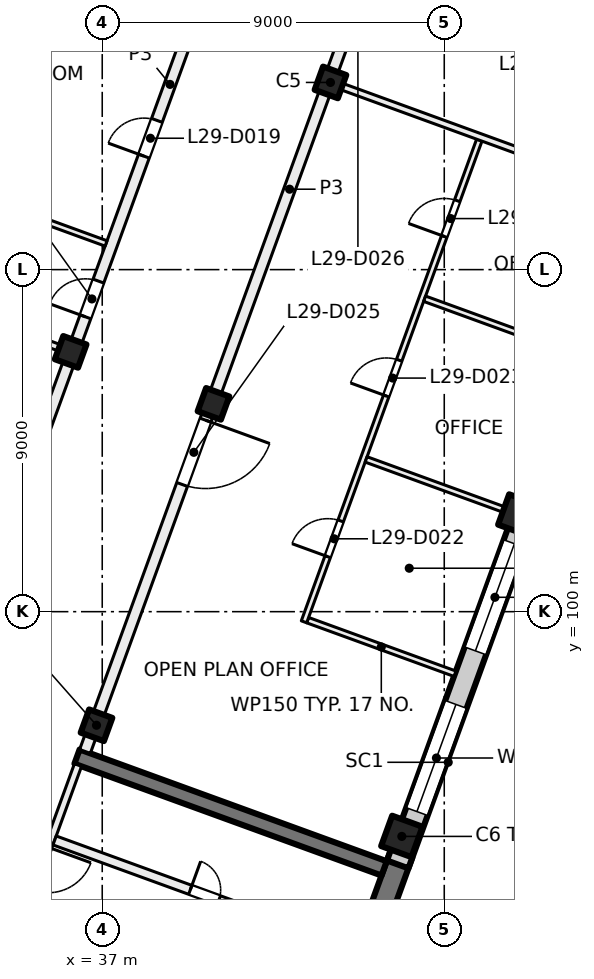
"""IFC4 building model, lengths in metres.
Left out: names, types, materials, properties, quantities, classifications, styles, units other than length and angle.
Written with IfcOpenShell. Run it as: python <this file> out.ifc"""

import sys

from ifc_helpers import new_model, si_unit, direction, frame, frame_2d, origin, origin_2d, place, context, subcontext, project, spatial, rectangle, extrude, element, fill, save


model = new_model("IFC4")
c1 = context("Model", 3, precision=1e-05, world=origin(), true_north=direction((0.0, 1.0)))
c2 = subcontext(c1, "Body", "Model", "MODEL_VIEW")
j1 = project(units=[si_unit("LENGTHUNIT", "METRE"), si_unit("PLANEANGLEUNIT", "RADIAN")], contexts=[c1])
p1 = place(None, origin())
s1 = spatial("IfcSite", under=j1, at=p1, CompositionType="ELEMENT")
p2 = place(p1, origin())
s2 = spatial("IfcBuilding", under=s1, at=p2, CompositionType="ELEMENT")
p3 = place(p2, frame((0.0, 0.0, 125.0)))
s3 = spatial("IfcBuildingStorey", under=s2, at=p3, CompositionType="ELEMENT", Elevation=125.0)
for number, where, z_axis, x_axis in (
    (1, (43.006, 113.925, 0.0), (0.0, 0.0, 1.0), (-0.342, -0.94, 0.0)),
    (2, (39.927, 105.468, 0.0), (0.0, 0.0, 1.0), (-0.342, -0.94, 0.0)),
    (3, (36.849, 97.011, 0.0), (0.0, 0.0, 1.0), (-0.342, -0.94, 0.0)),
    (4, (36.169, 106.836, 0.0), (0.0, 0.0, 1.0), (-0.342, -0.94, 0.0)),
):
    element("IfcColumn", number, at=place(p3, frame(where, z_axis=z_axis, x_axis=x_axis)), inside=s3, PredefinedType="COLUMN", context=c2, shape_type="SweptSolid", body=[
        extrude(rectangle(XDim=0.65, YDim=0.65, at=origin_2d()), origin(), (0.0, 0.0, 1.0), 4.0),
    ])
for number, where, z_axis, x_axis in (
    (5, (47.962, 102.544, 0.0), (0.0, 0.0, 1.0), (-0.342, -0.94, 0.0)),
    (6, (44.884, 94.087, 0.0), (0.0, 0.0, 1.0), (-0.342, -0.94, 0.0)),
):
    element("IfcColumn", number, at=place(p3, frame(where, z_axis=z_axis, x_axis=x_axis)), inside=s3, PredefinedType="COLUMN", context=c2, shape_type="SweptSolid", body=[
        extrude(rectangle(XDim=0.85, YDim=0.85, at=origin_2d()), origin(), (0.0, 0.0, 1.0), 4.0),
    ])
p4 = place(p3, frame((41.827, 85.249, 0.0), z_axis=(0.0, 0.0, 1.0), x_axis=(0.342017595281, 0.939693548195, 0.0)))
e7 = element("IfcWall", 7, at=p4, inside=s3, PredefinedType="SHEAR", context=c2, shape_type="SweptSolid", body=[
    extrude(rectangle(XDim=8.925, YDim=0.6, at=frame_2d((4.462, 0.0))), origin(), (0.0, 0.0, 1.0), 4.0),
])
p5 = place(p3, frame((44.418, 93.245, 0.0), z_axis=(0.0, 0.0, 1.0), x_axis=(-0.93969060187, 0.342025690201, 0.0)))
e8 = element("IfcWall", 8, at=p5, inside=s3, PredefinedType="SHEAR", context=c2, shape_type="SweptSolid", body=[
    extrude(rectangle(XDim=8.6, YDim=0.4, at=frame_2d((4.3, 0.0))), origin(), (0.0, 0.0, 1.0), 4.0),
])
p6 = place(p3, frame((52.212, 113.783, 0.0), z_axis=(0.0, 0.0, 1.0), x_axis=(-0.34202521188, -0.939690775968, 0.0)))
e9 = element("IfcWall", 9, at=p6, inside=s3, PredefinedType="SOLIDWALL", context=c2, shape_type="SweptSolid", body=[
    extrude(rectangle(XDim=21.745, YDim=0.6, at=frame_2d((10.873, 0.0))), origin(), (0.0, 0.0, 1.0), 3.625),
])
p7 = place(p6, frame((3.765, 0.0, 0.9)))
e10 = element("IfcOpeningElement", 10, at=p7, cuts=e9, PredefinedType="OPENING", context=c2, shape_type="SweptSolid", body=[
    extrude(rectangle(XDim=3.0, YDim=2.4, at=frame_2d((1.5, 1.2))), frame((0.0, 0.31, 0.0), z_axis=(0.0, -1.0, 0.0), x_axis=(1.0, 0.0, 0.0)), (0.0, 0.0, 1.0), 0.62),
])
p8 = place(p6, frame((8.265, 0.0, 0.9)))
e11 = element("IfcOpeningElement", 11, at=p8, cuts=e9, PredefinedType="OPENING", context=c2, shape_type="SweptSolid", body=[
    extrude(rectangle(XDim=3.0, YDim=2.4, at=frame_2d((1.5, 1.2))), frame((0.0, 0.31, 0.0), z_axis=(0.0, -1.0, 0.0), x_axis=(1.0, 0.0, 0.0)), (0.0, 0.0, 1.0), 0.62),
])
p9 = place(p6, frame((12.765, 0.0, 0.9)))
e12 = element("IfcOpeningElement", 12, at=p9, cuts=e9, PredefinedType="OPENING", context=c2, shape_type="SweptSolid", body=[
    extrude(rectangle(XDim=3.0, YDim=2.4, at=frame_2d((1.5, 1.2))), frame((0.0, 0.31, 0.0), z_axis=(0.0, -1.0, 0.0), x_axis=(1.0, 0.0, 0.0)), (0.0, 0.0, 1.0), 0.62),
])
p10 = place(p6, frame((17.265, 0.0, 0.9)))
e13 = element("IfcOpeningElement", 13, at=p10, cuts=e9, PredefinedType="OPENING", context=c2, shape_type="SweptSolid", body=[
    extrude(rectangle(XDim=3.0, YDim=2.4, at=frame_2d((1.5, 1.2))), frame((0.0, 0.31, 0.0), z_axis=(0.0, -1.0, 0.0), x_axis=(1.0, 0.0, 0.0)), (0.0, 0.0, 1.0), 0.62),
])
p11 = place(p3, frame((24.666, 100.669, 0.0), z_axis=(0.0, 0.0, 1.0), x_axis=(0.34201964167, 0.939692803373, 0.0)))
e14 = element("IfcWall", 14, at=p11, inside=s3, PredefinedType="SOLIDWALL", context=c2, shape_type="SweptSolid", body=[
    extrude(rectangle(XDim=32.884, YDim=0.6, at=frame_2d((16.442, 0.0))), origin(), (0.0, 0.0, 1.0), 3.625),
])
p12 = place(p11, frame((1.48, 0.0, 0.9)))
e15 = element("IfcOpeningElement", 15, at=p12, cuts=e14, PredefinedType="OPENING", context=c2, shape_type="SweptSolid", body=[
    extrude(rectangle(XDim=3.0, YDim=2.4, at=frame_2d((1.5, 1.2))), frame((0.0, 0.31, 0.0), z_axis=(0.0, -1.0, 0.0), x_axis=(1.0, 0.0, 0.0)), (0.0, 0.0, 1.0), 0.62),
])
p13 = place(p11, frame((5.98, 0.0, 0.9)))
e16 = element("IfcOpeningElement", 16, at=p13, cuts=e14, PredefinedType="OPENING", context=c2, shape_type="SweptSolid", body=[
    extrude(rectangle(XDim=3.0, YDim=2.4, at=frame_2d((1.5, 1.2))), frame((0.0, 0.31, 0.0), z_axis=(0.0, -1.0, 0.0), x_axis=(1.0, 0.0, 0.0)), (0.0, 0.0, 1.0), 0.62),
])
p14 = place(p11, frame((10.48, 0.0, 0.9)))
e17 = element("IfcOpeningElement", 17, at=p14, cuts=e14, PredefinedType="OPENING", context=c2, shape_type="SweptSolid", body=[
    extrude(rectangle(XDim=3.0, YDim=2.4, at=frame_2d((1.5, 1.2))), frame((0.0, 0.31, 0.0), z_axis=(0.0, -1.0, 0.0), x_axis=(1.0, 0.0, 0.0)), (0.0, 0.0, 1.0), 0.62),
])
p15 = place(p11, frame((14.98, 0.0, 0.9)))
e18 = element("IfcOpeningElement", 18, at=p15, cuts=e14, PredefinedType="OPENING", context=c2, shape_type="SweptSolid", body=[
    extrude(rectangle(XDim=3.0, YDim=2.4, at=frame_2d((1.5, 1.2))), frame((0.0, 0.31, 0.0), z_axis=(0.0, -1.0, 0.0), x_axis=(1.0, 0.0, 0.0)), (0.0, 0.0, 1.0), 0.62),
])
p16 = place(p11, frame((19.48, 0.0, 0.9)))
e19 = element("IfcOpeningElement", 19, at=p16, cuts=e14, PredefinedType="OPENING", context=c2, shape_type="SweptSolid", body=[
    extrude(rectangle(XDim=3.0, YDim=2.4, at=frame_2d((1.5, 1.2))), frame((0.0, 0.31, 0.0), z_axis=(0.0, -1.0, 0.0), x_axis=(1.0, 0.0, 0.0)), (0.0, 0.0, 1.0), 0.62),
])
p17 = place(p11, frame((23.98, 0.0, 0.9)))
e20 = element("IfcOpeningElement", 20, at=p17, cuts=e14, PredefinedType="OPENING", context=c2, shape_type="SweptSolid", body=[
    extrude(rectangle(XDim=3.0, YDim=2.4, at=frame_2d((1.5, 1.2))), frame((0.0, 0.31, 0.0), z_axis=(0.0, -1.0, 0.0), x_axis=(1.0, 0.0, 0.0)), (0.0, 0.0, 1.0), 0.62),
])
p18 = place(p11, frame((28.48, 0.0, 0.9)))
e21 = element("IfcOpeningElement", 21, at=p18, cuts=e14, PredefinedType="OPENING", context=c2, shape_type="SweptSolid", body=[
    extrude(rectangle(XDim=3.0, YDim=2.4, at=frame_2d((1.5, 1.2))), frame((0.0, 0.31, 0.0), z_axis=(0.0, -1.0, 0.0), x_axis=(1.0, 0.0, 0.0)), (0.0, 0.0, 1.0), 0.62),
])
p19 = place(p3, frame((36.362, 95.964, 0.0), z_axis=(0.0, 0.0, 1.0), x_axis=(-0.341995824804, -0.939701471648, 0.0)))
e22 = element("IfcWall", 22, at=p19, inside=s3, PredefinedType="PARTITIONING", context=c2, shape_type="SweptSolid", body=[
    extrude(rectangle(XDim=3.8, YDim=0.2, at=frame_2d((1.9, 0.0))), origin(), (0.0, 0.0, 1.0), 3.625),
])
p20 = place(p19, frame((2.3, 0.0, 0.0)))
e23 = element("IfcOpeningElement", 23, at=p20, cuts=e22, PredefinedType="OPENING", context=c2, shape_type="SweptSolid", body=[
    extrude(rectangle(XDim=1.2, YDim=2.1, at=frame_2d((0.6, 1.05))), frame((0.0, 0.11, 0.0), z_axis=(0.0, -1.0, 0.0), x_axis=(1.0, 0.0, 0.0)), (0.0, 0.0, 1.0), 0.22),
])
p21 = place(p3, frame((35.19, 92.453, 0.0), z_axis=(0.0, 0.0, 1.0), x_axis=(0.939691552312, -0.342023078919, 0.0)))
e24 = element("IfcWall", 24, at=p21, inside=s3, PredefinedType="PARTITIONING", context=c2, shape_type="SweptSolid", body=[
    extrude(rectangle(XDim=8.4, YDim=0.2, at=frame_2d((4.2, 0.0))), origin(), (0.0, 0.0, 1.0), 3.625),
])
p22 = place(p21, frame((5.25, 0.0, 0.0)))
e25 = element("IfcOpeningElement", 25, at=p22, cuts=e24, PredefinedType="OPENING", context=c2, shape_type="SweptSolid", body=[
    extrude(rectangle(XDim=1.5, YDim=2.1, at=frame_2d((0.75, 1.05))), frame((0.0, 0.11, 0.0), z_axis=(0.0, -1.0, 0.0), x_axis=(1.0, 0.0, 0.0)), (0.0, 0.0, 1.0), 0.22),
])
p23 = place(p3, frame((35.746, 93.98, 0.0), z_axis=(0.0, 0.0, 1.0), x_axis=(0.939691552312, -0.342023078919, 0.0)))
e26 = element("IfcWall", 26, at=p23, inside=s3, PredefinedType="PARTITIONING", context=c2, shape_type="SweptSolid", body=[
    extrude(rectangle(XDim=8.4, YDim=0.25, at=frame_2d((4.2, 0.0))), origin(), (0.0, 0.0, 1.0), 3.625),
])
p24 = place(p23, frame((3.8, 0.0, 0.0)))
e27 = element("IfcOpeningElement", 27, at=p24, cuts=e26, PredefinedType="OPENING", context=c2, shape_type="SweptSolid", body=[
    extrude(rectangle(XDim=0.8, YDim=2.1, at=frame_2d((0.4, 1.05))), frame((0.0, 0.135, 0.0), z_axis=(0.0, -1.0, 0.0), x_axis=(1.0, 0.0, 0.0)), (0.0, 0.0, 1.0), 0.27),
])
p25 = place(p3, frame((32.63, 108.124, 0.0), z_axis=(0.0, 0.0, 1.0), x_axis=(0.939692277825, -0.342021085601, 0.0)))
e28 = element("IfcWall", 28, at=p25, inside=s3, PredefinedType="PARTITIONING", context=c2, shape_type="SweptSolid", body=[
    extrude(rectangle(XDim=3.666, YDim=0.175, at=frame_2d((1.833, 0.0))), origin(), (0.0, 0.0, 1.0), 3.625),
])
p26 = place(p3, frame((32.881, 97.657, 0.0), z_axis=(0.0, 0.0, 1.0), x_axis=(0.342017360004, 0.939693633828, 0.0)))
e29 = element("IfcWall", 29, at=p26, inside=s3, PredefinedType="PARTITIONING", context=c2, shape_type="SweptSolid", body=[
    extrude(rectangle(XDim=34.516, YDim=0.3, at=frame_2d((17.258, 0.0))), origin(), (0.0, 0.0, 1.0), 3.625),
])
p27 = place(p26, frame((4.275, 0.0, 0.0)))
e30 = element("IfcOpeningElement", 30, at=p27, cuts=e29, PredefinedType="OPENING", context=c2, shape_type="SweptSolid", body=[
    extrude(rectangle(XDim=1.2, YDim=2.1, at=frame_2d((0.6, 1.05))), frame((0.0, 0.16, 0.0), z_axis=(0.0, -1.0, 0.0), x_axis=(1.0, 0.0, 0.0)), (0.0, 0.0, 1.0), 0.32),
])
p28 = place(p26, frame((10.75, 0.0, 0.0)))
e31 = element("IfcOpeningElement", 31, at=p28, cuts=e29, PredefinedType="OPENING", context=c2, shape_type="SweptSolid", body=[
    extrude(rectangle(XDim=1.0, YDim=2.1, at=frame_2d((0.5, 1.05))), frame((0.0, 0.16, 0.0), z_axis=(0.0, -1.0, 0.0), x_axis=(1.0, 0.0, 0.0)), (0.0, 0.0, 1.0), 0.32),
])
p29 = place(p26, frame((15.25, 0.0, 0.0)))
e32 = element("IfcOpeningElement", 32, at=p29, cuts=e29, PredefinedType="OPENING", context=c2, shape_type="SweptSolid", body=[
    extrude(rectangle(XDim=1.0, YDim=2.1, at=frame_2d((0.5, 1.05))), frame((0.0, 0.16, 0.0), z_axis=(0.0, -1.0, 0.0), x_axis=(1.0, 0.0, 0.0)), (0.0, 0.0, 1.0), 0.32),
])
p30 = place(p26, frame((20.4, 0.0, 0.0)))
e33 = element("IfcOpeningElement", 33, at=p30, cuts=e29, PredefinedType="OPENING", context=c2, shape_type="SweptSolid", body=[
    extrude(rectangle(XDim=1.2, YDim=2.1, at=frame_2d((0.6, 1.05))), frame((0.0, 0.16, 0.0), z_axis=(0.0, -1.0, 0.0), x_axis=(1.0, 0.0, 0.0)), (0.0, 0.0, 1.0), 0.32),
])
p31 = place(p26, frame((25.0, 0.0, 0.0)))
e34 = element("IfcOpeningElement", 34, at=p31, cuts=e29, PredefinedType="OPENING", context=c2, shape_type="SweptSolid", body=[
    extrude(rectangle(XDim=1.0, YDim=2.1, at=frame_2d((0.5, 1.05))), frame((0.0, 0.16, 0.0), z_axis=(0.0, -1.0, 0.0), x_axis=(1.0, 0.0, 0.0)), (0.0, 0.0, 1.0), 0.32),
])
p32 = place(p3, frame((33.507, 110.998, 0.0), z_axis=(0.0, 0.0, 1.0), x_axis=(0.939610657605, -0.342245251415, 0.0)))
e35 = element("IfcWall", 35, at=p32, inside=s3, PredefinedType="PARTITIONING", context=c2, shape_type="SweptSolid", body=[
    extrude(rectangle(XDim=3.825, YDim=0.15, at=frame_2d((1.913, 0.0))), origin(), (0.0, 0.0, 1.0), 3.625),
])
p33 = place(p3, frame((46.282, 98.367, 0.0), z_axis=(0.0, 0.0, 1.0), x_axis=(-0.939765774653, 0.341819087808, 0.0)))
e36 = element("IfcWall", 36, at=p33, inside=s3, PredefinedType="PARTITIONING", context=c2, shape_type="SweptSolid", body=[
    extrude(rectangle(XDim=4.125, YDim=0.15, at=frame_2d((2.063, 0.0))), origin(), (0.0, 0.0, 1.0), 3.625),
])
p34 = place(p3, frame((42.309, 99.733, 0.0), z_axis=(0.0, 0.0, 1.0), x_axis=(0.342023551531, 0.939691380293, 0.0)))
e37 = element("IfcWall", 37, at=p34, inside=s3, PredefinedType="PARTITIONING", context=c2, shape_type="SweptSolid", body=[
    extrude(rectangle(XDim=13.488, YDim=0.15, at=frame_2d((6.744, 0.0))), origin(), (0.0, 0.0, 1.0), 3.625),
])
p35 = place(p34, frame((1.825, 0.0, 0.0)))
e38 = element("IfcOpeningElement", 38, at=p35, cuts=e37, PredefinedType="OPENING", context=c2, shape_type="SweptSolid", body=[
    extrude(rectangle(XDim=1.0, YDim=2.1, at=frame_2d((0.5, 1.05))), frame((0.0, 0.085, 0.0), z_axis=(0.0, -1.0, 0.0), x_axis=(1.0, 0.0, 0.0)), (0.0, 0.0, 1.0), 0.17),
])
p36 = place(p34, frame((6.325, 0.0, 0.0)))
e39 = element("IfcOpeningElement", 39, at=p36, cuts=e37, PredefinedType="OPENING", context=c2, shape_type="SweptSolid", body=[
    extrude(rectangle(XDim=1.0, YDim=2.1, at=frame_2d((0.5, 1.05))), frame((0.0, 0.085, 0.0), z_axis=(0.0, -1.0, 0.0), x_axis=(1.0, 0.0, 0.0)), (0.0, 0.0, 1.0), 0.17),
])
p37 = place(p34, frame((10.791, 0.0, 0.0)))
e40 = element("IfcOpeningElement", 40, at=p37, cuts=e37, PredefinedType="OPENING", context=c2, shape_type="SweptSolid", body=[
    extrude(rectangle(XDim=1.0, YDim=2.1, at=frame_2d((0.5, 1.05))), frame((0.0, 0.085, 0.0), z_axis=(0.0, -1.0, 0.0), x_axis=(1.0, 0.0, 0.0)), (0.0, 0.0, 1.0), 0.17),
])
p38 = place(p3, frame((43.1, 113.891, 0.0), z_axis=(0.0, 0.0, 1.0), x_axis=(0.939670544866, -0.342080790328, 0.0)))
e41 = element("IfcWall", 41, at=p38, inside=s3, PredefinedType="PARTITIONING", context=c2, shape_type="SweptSolid", body=[
    extrude(rectangle(XDim=8.3, YDim=0.175, at=frame_2d((4.15, 0.0))), origin(), (0.0, 0.0, 1.0), 3.625),
])
p39 = place(p3, frame((43.944, 104.006, 0.0), z_axis=(0.0, 0.0, 1.0), x_axis=(0.939689717042, -0.34202812119, 0.0)))
e42 = element("IfcWall", 42, at=p39, inside=s3, PredefinedType="PARTITIONING", context=c2, shape_type="SweptSolid", body=[
    extrude(rectangle(XDim=4.126, YDim=0.15, at=frame_2d((2.063, 0.0))), origin(), (0.0, 0.0, 1.0), 3.625),
])
p40 = place(p3, frame((45.483, 108.234, 0.0), z_axis=(0.0, 0.0, 1.0), x_axis=(0.939791695678, -0.341747814529, 0.0)))
e43 = element("IfcWall", 43, at=p40, inside=s3, PredefinedType="PARTITIONING", context=c2, shape_type="SweptSolid", body=[
    extrude(rectangle(XDim=4.125, YDim=0.15, at=frame_2d((2.063, 0.0))), origin(), (0.0, 0.0, 1.0), 3.625),
])
p41 = place(p3, frame((47.314, 125.909, 0.0), z_axis=(0.0, 0.0, 1.0), x_axis=(-0.342010770371, -0.939696032209, 0.0)))
e44 = element("IfcWall", 44, at=p41, inside=s3, PredefinedType="PARTITIONING", context=c2, shape_type="SweptSolid", body=[
    extrude(rectangle(XDim=31.485, YDim=0.3, at=frame_2d((15.742, 0.0))), origin(), (0.0, 0.0, 1.0), 3.625),
])
p42 = place(p41, frame((22.21, 0.0, 0.0)))
e45 = element("IfcOpeningElement", 45, at=p42, cuts=e44, PredefinedType="OPENING", context=c2, shape_type="SweptSolid", body=[
    extrude(rectangle(XDim=1.8, YDim=2.1, at=frame_2d((0.9, 1.05))), frame((0.0, 0.16, 0.0), z_axis=(0.0, -1.0, 0.0), x_axis=(1.0, 0.0, 0.0)), (0.0, 0.0, 1.0), 0.32),
])
p43 = place(p41, frame((9.885, 0.0, 0.0)))
e46 = element("IfcOpeningElement", 46, at=p43, cuts=e44, PredefinedType="OPENING", context=c2, shape_type="SweptSolid", body=[
    extrude(rectangle(XDim=1.2, YDim=2.1, at=frame_2d((0.6, 1.05))), frame((0.0, 0.16, 0.0), z_axis=(0.0, -1.0, 0.0), x_axis=(1.0, 0.0, 0.0)), (0.0, 0.0, 1.0), 0.32),
])
p44 = place(p41, frame((5.484, 0.0, 0.0)))
e47 = element("IfcOpeningElement", 47, at=p44, cuts=e44, PredefinedType="OPENING", context=c2, shape_type="SweptSolid", body=[
    extrude(rectangle(XDim=1.0, YDim=2.1, at=frame_2d((0.5, 1.05))), frame((0.0, 0.16, 0.0), z_axis=(0.0, -1.0, 0.0), x_axis=(1.0, 0.0, 0.0)), (0.0, 0.0, 1.0), 0.32),
])
p45 = place(p9, origin())
e48 = element("IfcWindow", 48, at=p45, inside=s3, PartitioningType="SINGLE_PANEL", PredefinedType="WINDOW", context=c2, shape_type="SweptSolid", body=[
    extrude(rectangle(XDim=3.0, YDim=2.4, at=frame_2d((1.5, 1.2))), frame((0.0, 0.03, 0.0), z_axis=(0.0, -1.0, 0.0), x_axis=(1.0, 0.0, 0.0)), (0.0, 0.0, 1.0), 0.06),
])
fill(e12, e48)
p46 = place(p10, origin())
e49 = element("IfcWindow", 49, at=p46, inside=s3, PartitioningType="SINGLE_PANEL", PredefinedType="WINDOW", context=c2, shape_type="SweptSolid", body=[
    extrude(rectangle(XDim=3.0, YDim=2.4, at=frame_2d((1.5, 1.2))), frame((0.0, 0.03, 0.0), z_axis=(0.0, -1.0, 0.0), x_axis=(1.0, 0.0, 0.0)), (0.0, 0.0, 1.0), 0.06),
])
fill(e13, e49)
p47 = place(p24, origin())
e50 = element("IfcDoor", 50, at=p47, inside=s3, OperationType="SINGLE_SWING_RIGHT", PredefinedType="DOOR", context=c2, shape_type="SweptSolid", body=[
    extrude(rectangle(XDim=0.8, YDim=2.1, at=frame_2d((0.4, 1.05))), frame((0.0, 0.025, 0.0), z_axis=(0.0, -1.0, 0.0), x_axis=(1.0, 0.0, 0.0)), (0.0, 0.0, 1.0), 0.05),
])
fill(e27, e50)
p48 = place(p28, origin())
e51 = element("IfcDoor", 51, at=p48, inside=s3, OperationType="SINGLE_SWING_RIGHT", PredefinedType="DOOR", context=c2, shape_type="SweptSolid", body=[
    extrude(rectangle(XDim=1.0, YDim=2.1, at=frame_2d((0.5, 1.05))), frame((0.0, 0.025, 0.0), z_axis=(0.0, -1.0, 0.0), x_axis=(1.0, 0.0, 0.0)), (0.0, 0.0, 1.0), 0.05),
])
fill(e31, e51)
p49 = place(p29, origin())
e52 = element("IfcDoor", 52, at=p49, inside=s3, OperationType="SINGLE_SWING_LEFT", PredefinedType="DOOR", context=c2, shape_type="SweptSolid", body=[
    extrude(rectangle(XDim=1.0, YDim=2.1, at=frame_2d((0.5, 1.05))), frame((0.0, 0.025, 0.0), z_axis=(0.0, -1.0, 0.0), x_axis=(1.0, 0.0, 0.0)), (0.0, 0.0, 1.0), 0.05),
])
fill(e32, e52)
p50 = place(p35, origin())
e53 = element("IfcDoor", 53, at=p50, inside=s3, OperationType="SINGLE_SWING_LEFT", PredefinedType="DOOR", context=c2, shape_type="SweptSolid", body=[
    extrude(rectangle(XDim=1.0, YDim=2.1, at=frame_2d((0.5, 1.05))), frame((0.0, 0.025, 0.0), z_axis=(0.0, -1.0, 0.0), x_axis=(1.0, 0.0, 0.0)), (0.0, 0.0, 1.0), 0.05),
])
fill(e38, e53)
p51 = place(p36, origin())
e54 = element("IfcDoor", 54, at=p51, inside=s3, OperationType="SINGLE_SWING_LEFT", PredefinedType="DOOR", context=c2, shape_type="SweptSolid", body=[
    extrude(rectangle(XDim=1.0, YDim=2.1, at=frame_2d((0.5, 1.05))), frame((0.0, 0.025, 0.0), z_axis=(0.0, -1.0, 0.0), x_axis=(1.0, 0.0, 0.0)), (0.0, 0.0, 1.0), 0.05),
])
fill(e39, e54)
p52 = place(p37, origin())
e55 = element("IfcDoor", 55, at=p52, inside=s3, OperationType="SINGLE_SWING_LEFT", PredefinedType="DOOR", context=c2, shape_type="SweptSolid", body=[
    extrude(rectangle(XDim=1.0, YDim=2.1, at=frame_2d((0.5, 1.05))), frame((0.0, 0.025, 0.0), z_axis=(0.0, -1.0, 0.0), x_axis=(1.0, 0.0, 0.0)), (0.0, 0.0, 1.0), 0.05),
])
fill(e40, e55)
p53 = place(p42, origin())
e56 = element("IfcDoor", 56, at=p53, inside=s3, OperationType="DOUBLE_DOOR_SINGLE_SWING", PredefinedType="DOOR", context=c2, shape_type="SweptSolid", body=[
    extrude(rectangle(XDim=1.8, YDim=2.1, at=frame_2d((0.9, 1.05))), frame((0.0, 0.025, 0.0), z_axis=(0.0, -1.0, 0.0), x_axis=(1.0, 0.0, 0.0)), (0.0, 0.0, 1.0), 0.05),
])
fill(e45, e56)
save(model, sys.argv[1])
